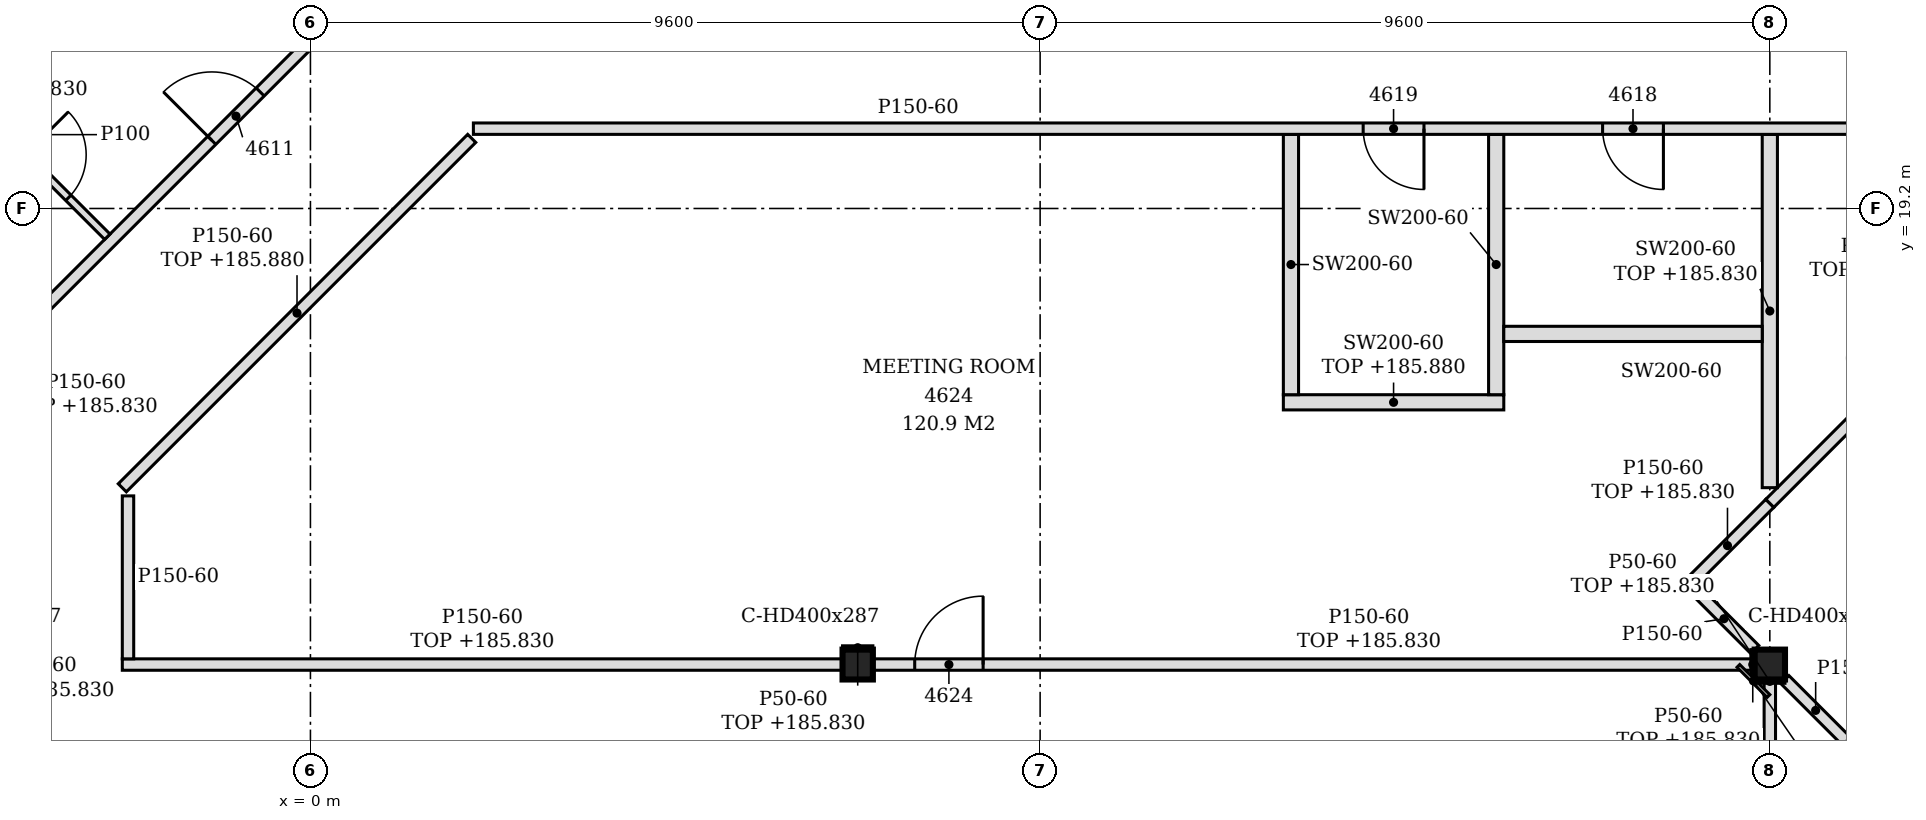
"""IFC4 building model, lengths in metres.
Left out: names, types, materials, properties, quantities, classifications, styles, units other than length and angle.
Written with IfcOpenShell. Run it as: python <this file> out.ifc"""

import sys

from ifc_helpers import new_model, si_unit, direction, frame, frame_2d, origin, origin_2d, place, context, subcontext, project, spatial, polyline, rectangle, i_section, outline, extrude, element, fill, save


model = new_model("IFC4")
c1 = context("Model", 3, precision=1e-05, world=origin(), true_north=direction((0.0, 1.0)))
c2 = subcontext(c1, "Body", "Model", "MODEL_VIEW")
j1 = project(units=[si_unit("LENGTHUNIT", "METRE"), si_unit("PLANEANGLEUNIT", "RADIAN")], contexts=[c1])
p1 = place(None, origin())
s1 = spatial("IfcSite", under=j1, at=p1, CompositionType="ELEMENT")
p2 = place(p1, origin())
s2 = spatial("IfcBuilding", under=s1, at=p2, CompositionType="ELEMENT")
p3 = place(p2, frame((0.0, 0.0, 183.0)))
s3 = spatial("IfcBuildingStorey", under=s2, at=p3, CompositionType="ELEMENT", Elevation=183.0)
for number, where, z_axis, x_axis in (
    (1, (7.2, 13.2, -0.15), (0.0, 0.0, 1.0), (1.0, 0.0, 0.0)),
    (2, (19.2, 13.2, -0.15), (0.0, 0.0, 1.0), (1.0, 0.0, 0.0)),
):
    element("IfcColumn", number, at=place(p3, frame(where, z_axis=z_axis, x_axis=x_axis)), inside=s3, PredefinedType="COLUMN", context=c2, shape_type="SweptSolid", body=[
        extrude(i_section(OverallWidth=0.399, OverallDepth=0.393, WebThickness=0.023, FlangeThickness=0.037, FilletRadius=0.015, at=origin_2d()), origin(), (0.0, 0.0, 1.0), 3.6),
    ])
p4 = place(p3, frame((19.2, 3.675, 0.0), z_axis=(0.0, 0.0, 1.0), x_axis=(0.0, 1.0, 0.0)))
e3 = element("IfcWall", 3, at=p4, inside=s3, PredefinedType="PARTITIONING", context=c2, shape_type="SweptSolid", body=[
    extrude(rectangle(XDim=9.328, YDim=0.15, at=frame_2d((4.664, 0.0))), origin(), (0.0, 0.0, 1.0), 2.83),
])
p5 = place(p3, frame((-14.475, 6.919, 0.0), z_axis=(0.0, 0.0, 1.0), x_axis=(0.707106781187, 0.707106781187, 0.0)))
e4 = element("IfcWall", 4, at=p5, inside=s3, PredefinedType="PARTITIONING", context=c2, shape_type="SweptSolid", body=[
    extrude(rectangle(XDim=22.066, YDim=0.15, at=frame_2d((11.033, 0.0))), origin(), (0.0, 0.0, 1.0), 2.83),
])
p6 = place(p5, frame((18.636, 0.0, 0.0)))
e5 = element("IfcOpeningElement", 5, at=p6, cuts=e4, PredefinedType="OPENING", context=c2, shape_type="SweptSolid", body=[
    extrude(rectangle(XDim=0.9, YDim=2.1, at=frame_2d((0.45, 1.05))), frame((0.0, 0.085, 0.0), z_axis=(0.0, -1.0, 0.0), x_axis=(1.0, 0.0, 0.0)), (0.0, 0.0, 1.0), 0.17),
])
p7 = place(p5, frame((10.648, 0.0, 0.0)))
e6 = element("IfcOpeningElement", 6, at=p7, cuts=e4, PredefinedType="OPENING", context=c2, shape_type="SweptSolid", body=[
    extrude(rectangle(XDim=0.9, YDim=2.1, at=frame_2d((0.45, 1.05))), frame((0.0, 0.085, 0.0), z_axis=(0.0, -1.0, 0.0), x_axis=(1.0, 0.0, 0.0)), (0.0, 0.0, 1.0), 0.17),
])
p8 = place(p5, frame((6.26, 0.0, 0.0)))
e7 = element("IfcOpeningElement", 7, at=p8, cuts=e4, PredefinedType="OPENING", context=c2, shape_type="SweptSolid", body=[
    extrude(rectangle(XDim=0.9, YDim=2.1, at=frame_2d((0.45, 1.05))), frame((0.0, 0.085, 0.0), z_axis=(0.0, -1.0, 0.0), x_axis=(1.0, 0.0, 0.0)), (0.0, 0.0, 1.0), 0.17),
])
p9 = place(p3, frame((20.208, 12.086, 0.0), z_axis=(0.0, 0.0, 1.0), x_axis=(0.706747296365, 0.707466083343, 0.0)))
e8 = element("IfcWall", 8, at=p9, inside=s3, PredefinedType="PARTITIONING", context=c2, shape_type="SweptSolid", body=[
    extrude(rectangle(XDim=1.359, YDim=0.15, at=frame_2d((0.679, 0.0))), origin(), (0.0, 0.0, 1.0), 2.88),
])
p10 = place(p3, frame((20.208, 12.192, 0.0), z_axis=(0.0, 0.0, 1.0), x_axis=(-0.70721334539, 0.707000200921, 0.0)))
e9 = element("IfcWall", 9, at=p10, inside=s3, PredefinedType="PARTITIONING", context=c2, shape_type="SweptSolid", body=[
    extrude(rectangle(XDim=1.146, YDim=0.15, at=frame_2d((0.573, 0.0))), origin(), (0.0, 0.0, 1.0), 3.45),
])
p11 = place(p3, frame((-2.475, 13.2, 0.0), z_axis=(0.0, 0.0, 1.0), x_axis=(1.0, 0.0, 0.0)))
e10 = element("IfcWall", 10, at=p11, inside=s3, PredefinedType="PARTITIONING", context=c2, shape_type="SweptSolid", body=[
    extrude(rectangle(XDim=9.476, YDim=0.15, at=frame_2d((4.738, 0.0))), origin(), (0.0, 0.0, 1.0), 2.83),
])
p12 = place(p3, frame((7.399, 13.2, 0.0), z_axis=(0.0, 0.0, 1.0), x_axis=(1.0, 0.0, 0.0)))
e11 = element("IfcWall", 11, at=p12, inside=s3, PredefinedType="PARTITIONING", context=c2, shape_type="SweptSolid", body=[
    extrude(rectangle(XDim=11.601, YDim=0.15, at=frame_2d((5.801, 0.0))), origin(), (0.0, 0.0, 1.0), 2.83),
])
p13 = place(p12, frame((0.551, 0.0, 0.0)))
e12 = element("IfcOpeningElement", 12, at=p13, cuts=e11, PredefinedType="OPENING", context=c2, shape_type="SweptSolid", body=[
    extrude(rectangle(XDim=0.9, YDim=2.1, at=frame_2d((0.45, 1.05))), frame((0.0, 0.085, 0.0), z_axis=(0.0, -1.0, 0.0), x_axis=(1.0, 0.0, 0.0)), (0.0, 0.0, 1.0), 0.17),
])
p14 = place(p3, frame((-2.4, 13.275, 0.0), z_axis=(0.0, 0.0, 1.0), x_axis=(0.0, 1.0, 0.0)))
e13 = element("IfcWall", 13, at=p14, inside=s3, PredefinedType="PARTITIONING", context=c2, shape_type="SweptSolid", body=[
    extrude(outline(polyline([(0.0, 0.0), (2.144, 0.0), (2.144, 3.45), (0.075, 3.45), (0.073, 2.83), (0.0, 2.83), (0.0, 0.0)])), frame((0.0, 0.075, 0.0), z_axis=(0.0, -1.0, 0.0), x_axis=(1.0, 0.0, 0.0)), (0.0, 0.0, 1.0), 0.15),
])
p15 = place(p3, frame((19.002, 13.398, 0.0), z_axis=(0.0, 0.0, 1.0), x_axis=(-0.707000200921, 0.70721334539, 0.0)))
e14 = element("IfcWall", 14, at=p15, inside=s3, PredefinedType="PARTITIONING", context=c2, shape_type="SweptSolid", body=[
    extrude(rectangle(XDim=1.146, YDim=0.15, at=frame_2d((0.573, 0.0))), origin(), (0.0, 0.0, 1.0), 3.45),
])
p16 = place(p3, frame((18.086, 14.208, 0.0), z_axis=(0.0, 0.0, 1.0), x_axis=(0.707416779731, 0.706796646678, 0.0)))
e15 = element("IfcWall", 15, at=p16, inside=s3, PredefinedType="PARTITIONING", context=c2, shape_type="SweptSolid", body=[
    extrude(rectangle(XDim=1.575, YDim=0.15, at=frame_2d((0.787, 0.0))), origin(), (0.0, 0.0, 1.0), 2.83),
])
p17 = place(p3, frame((19.2, 15.321, 0.0), z_axis=(0.0, 0.0, 1.0), x_axis=(0.707106781187, 0.707106781187, 0.0)))
e16 = element("IfcWall", 16, at=p17, inside=s3, PredefinedType="PARTITIONING", context=c2, shape_type="SweptSolid", body=[
    extrude(rectangle(XDim=4.581, YDim=0.15, at=frame_2d((2.29, 0.0))), origin(), (0.0, 0.0, 1.0), 2.83),
])
p18 = place(p17, frame((1.803, 0.0, 0.0)))
e17 = element("IfcOpeningElement", 17, at=p18, cuts=e16, PredefinedType="OPENING", context=c2, shape_type="SweptSolid", body=[
    extrude(rectangle(XDim=0.9, YDim=2.1, at=frame_2d((0.45, 1.05))), frame((0.0, 0.085, 0.0), z_axis=(0.0, -1.0, 0.0), x_axis=(1.0, 0.0, 0.0)), (0.0, 0.0, 1.0), 0.17),
])
p19 = place(p3, frame((-2.475, 15.525, 0.0), z_axis=(0.0, 0.0, 1.0), x_axis=(0.707106781187, 0.707106781187, 0.0)))
e18 = element("IfcWall", 18, at=p19, inside=s3, PredefinedType="PARTITIONING", context=c2, shape_type="SweptSolid", body=[
    extrude(rectangle(XDim=6.501, YDim=0.15, at=frame_2d((3.251, 0.0))), origin(), (0.0, 0.0, 1.0), 2.88),
])
p20 = place(p3, frame((19.2, 15.527, 0.0), z_axis=(0.0, 0.0, 1.0), x_axis=(0.0, 1.0, 0.0)))
e19 = element("IfcWall", 19, at=p20, inside=s3, PredefinedType="PARTITIONING", context=c2, shape_type="SweptSolid", body=[
    extrude(rectangle(XDim=4.648, YDim=0.2, at=frame_2d((2.324, 0.0))), origin(), (0.0, 0.0, 1.0), 2.83),
])
p21 = place(p3, frame((12.8, 16.65, 0.0), z_axis=(0.0, 0.0, 1.0), x_axis=(1.0, 0.0, 0.0)))
e20 = element("IfcWall", 20, at=p21, inside=s3, PredefinedType="PARTITIONING", context=c2, shape_type="SweptSolid", body=[
    extrude(rectangle(XDim=2.9, YDim=0.2, at=frame_2d((1.45, 0.0))), origin(), (0.0, 0.0, 1.0), 2.88),
])
for number, where, z_axis, x_axis in (
    (21, (12.9, 16.75, 0.0), (0.0, 0.0, 1.0), (0.0, 1.0, 0.0)),
    (22, (15.6, 16.75, 0.0), (0.0, 0.0, 1.0), (0.0, 1.0, 0.0)),
):
    element("IfcWall", number, at=place(p3, frame(where, z_axis=z_axis, x_axis=x_axis)), inside=s3, PredefinedType="PARTITIONING", context=c2, shape_type="SweptSolid", body=[
        extrude(outline(polyline([(0.0, 0.0), (3.425, 0.0), (3.425, 3.45), (0.155, 3.45), (0.153, 2.88), (0.0, 2.88), (0.0, 0.0)])), frame((0.0, 0.1, 0.0), z_axis=(0.0, -1.0, 0.0), x_axis=(1.0, 0.0, 0.0)), (0.0, 0.0, 1.0), 0.2),
    ])
p22 = place(p3, frame((15.7, 17.55, 0.0), z_axis=(0.0, 0.0, 1.0), x_axis=(1.0, 0.0, 0.0)))
e23 = element("IfcWall", 23, at=p22, inside=s3, PredefinedType="PARTITIONING", context=c2, shape_type="SweptSolid", body=[
    extrude(outline(polyline([(0.0, 0.0), (3.4, 0.0), (3.4, 2.83), (3.35, 2.83), (3.348, 3.45), (0.0, 3.45), (0.0, 0.0)])), frame((0.0, 0.1, 0.0), z_axis=(0.0, -1.0, 0.0), x_axis=(1.0, 0.0, 0.0)), (0.0, 0.0, 1.0), 0.2),
])
p23 = place(p3, frame((-2.672, 18.828, 0.0), z_axis=(0.0, 0.0, 1.0), x_axis=(-0.707053116953, 0.707160441348, 0.0)))
e24 = element("IfcWall", 24, at=p23, inside=s3, PredefinedType="PARTITIONING", context=c2, shape_type="SweptSolid", body=[
    extrude(rectangle(XDim=2.275, YDim=0.1, at=frame_2d((1.137, 0.0))), origin(), (0.0, 0.0, 1.0), 3.45),
])
p24 = place(p23, frame((0.725, 0.0, 0.0)))
e25 = element("IfcOpeningElement", 25, at=p24, cuts=e24, PredefinedType="OPENING", context=c2, shape_type="SweptSolid", body=[
    extrude(rectangle(XDim=0.8, YDim=2.1, at=frame_2d((0.4, 1.05))), frame((0.0, 0.06, 0.0), z_axis=(0.0, -1.0, 0.0), x_axis=(1.0, 0.0, 0.0)), (0.0, 0.0, 1.0), 0.12),
])
p25 = place(p3, frame((2.144, 20.25, 0.0), z_axis=(0.0, 0.0, 1.0), x_axis=(1.0, 0.0, 0.0)))
e26 = element("IfcWall", 26, at=p25, inside=s3, PredefinedType="PARTITIONING", context=c2, shape_type="SweptSolid", body=[
    extrude(outline(polyline([(0.0, 0.0), (18.605, 0.0), (18.605, 3.45), (17.206, 3.45), (17.204, 2.83), (16.906, 2.83), (16.904, 3.45), (5.206, 3.45), (5.204, 2.83), (4.906, 2.83), (4.904, 3.45), (0.0, 3.45), (0.0, 0.0)])), frame((0.0, 0.075, 0.0), z_axis=(0.0, -1.0, 0.0), x_axis=(1.0, 0.0, 0.0)), (0.0, 0.0, 1.0), 0.15),
])
p26 = place(p25, frame((14.856, 0.0, 0.0)))
e27 = element("IfcOpeningElement", 27, at=p26, cuts=e26, PredefinedType="OPENING", context=c2, shape_type="SweptSolid", body=[
    extrude(rectangle(XDim=0.8, YDim=2.1, at=frame_2d((0.4, 1.05))), frame((0.0, 0.085, 0.0), z_axis=(0.0, -1.0, 0.0), x_axis=(1.0, 0.0, 0.0)), (0.0, 0.0, 1.0), 0.17),
])
p27 = place(p25, frame((11.706, 0.0, 0.0)))
e28 = element("IfcOpeningElement", 28, at=p27, cuts=e26, PredefinedType="OPENING", context=c2, shape_type="SweptSolid", body=[
    extrude(rectangle(XDim=0.8, YDim=2.1, at=frame_2d((0.4, 1.05))), frame((0.0, 0.085, 0.0), z_axis=(0.0, -1.0, 0.0), x_axis=(1.0, 0.0, 0.0)), (0.0, 0.0, 1.0), 0.17),
])
p28 = place(p3, frame((18.976, 13.003, 0.0), z_axis=(0.0, 0.0, 1.0), x_axis=(0.0, 1.0, 0.0)))
e29 = element("IfcWall", 29, at=p28, inside=s3, PredefinedType="PARTITIONING", context=c2, shape_type="SweptSolid", body=[
    extrude(rectangle(XDim=0.393, YDim=0.05, at=frame_2d((0.197, 0.0))), origin(), (0.0, 0.0, 1.0), 2.83),
])
p29 = place(p3, frame((19.182, 12.786, 0.0), z_axis=(0.0, 0.0, 1.0), x_axis=(-0.707106781187, 0.707106781187, 0.0)))
e30 = element("IfcWall", 30, at=p29, inside=s3, PredefinedType="PARTITIONING", context=c2, shape_type="SweptSolid", body=[
    extrude(rectangle(XDim=0.56, YDim=0.05, at=frame_2d((0.28, 0.0))), origin(), (0.0, 0.0, 1.0), 2.83),
])
for number, where, z_axis, x_axis in (
    (31, (7.0, 13.421, 0.0), (0.0, 0.0, 1.0), (1.0, 0.0, 0.0)),
    (32, (19.0, 12.979, 0.0), (0.0, 0.0, 1.0), (1.0, 0.0, 0.0)),
):
    element("IfcWall", number, at=place(p3, frame(where, z_axis=z_axis, x_axis=x_axis)), inside=s3, PredefinedType="PARTITIONING", context=c2, shape_type="SweptSolid", body=[
        extrude(rectangle(XDim=0.399, YDim=0.05, at=frame_2d((0.199, 0.0))), origin(), (0.0, 0.0, 1.0), 2.83),
    ])
p30 = place(p6, origin())
e33 = element("IfcDoor", 33, at=p30, inside=s3, OperationType="SINGLE_SWING_LEFT", PredefinedType="DOOR", context=c2, shape_type="SweptSolid", body=[
    extrude(rectangle(XDim=0.9, YDim=2.1, at=frame_2d((0.45, 1.05))), frame((0.0, 0.025, 0.0), z_axis=(0.0, -1.0, 0.0), x_axis=(1.0, 0.0, 0.0)), (0.0, 0.0, 1.0), 0.05),
])
fill(e5, e33)
p31 = place(p24, frame((0.8, 0.0, 0.0), z_axis=(0.0, 0.0, 1.0), x_axis=(-1.0, 0.0, 0.0)))
e34 = element("IfcDoor", 34, at=p31, inside=s3, OperationType="SINGLE_SWING_LEFT", PredefinedType="DOOR", context=c2, shape_type="SweptSolid", body=[
    extrude(rectangle(XDim=0.8, YDim=2.1, at=frame_2d((0.4, 1.05))), frame((0.0, 0.025, 0.0), z_axis=(0.0, -1.0, 0.0), x_axis=(1.0, 0.0, 0.0)), (0.0, 0.0, 1.0), 0.05),
])
fill(e25, e34)
p32 = place(p26, frame((0.8, 0.0, 0.0), z_axis=(0.0, 0.0, 1.0), x_axis=(-1.0, 0.0, 0.0)))
e35 = element("IfcDoor", 35, at=p32, inside=s3, OperationType="SINGLE_SWING_LEFT", PredefinedType="DOOR", context=c2, shape_type="SweptSolid", body=[
    extrude(rectangle(XDim=0.8, YDim=2.1, at=frame_2d((0.4, 1.05))), frame((0.0, 0.025, 0.0), z_axis=(0.0, -1.0, 0.0), x_axis=(1.0, 0.0, 0.0)), (0.0, 0.0, 1.0), 0.05),
])
fill(e27, e35)
p33 = place(p27, frame((0.8, 0.0, 0.0), z_axis=(0.0, 0.0, 1.0), x_axis=(-1.0, 0.0, 0.0)))
e36 = element("IfcDoor", 36, at=p33, inside=s3, OperationType="SINGLE_SWING_LEFT", PredefinedType="DOOR", context=c2, shape_type="SweptSolid", body=[
    extrude(rectangle(XDim=0.8, YDim=2.1, at=frame_2d((0.4, 1.05))), frame((0.0, 0.025, 0.0), z_axis=(0.0, -1.0, 0.0), x_axis=(1.0, 0.0, 0.0)), (0.0, 0.0, 1.0), 0.05),
])
fill(e28, e36)
p34 = place(p13, origin())
e37 = element("IfcDoor", 37, at=p34, inside=s3, OperationType="SINGLE_SWING_RIGHT", PredefinedType="DOOR", context=c2, shape_type="SweptSolid", body=[
    extrude(rectangle(XDim=0.9, YDim=2.1, at=frame_2d((0.45, 1.05))), frame((0.0, 0.025, 0.0), z_axis=(0.0, -1.0, 0.0), x_axis=(1.0, 0.0, 0.0)), (0.0, 0.0, 1.0), 0.05),
])
fill(e12, e37)
save(model, sys.argv[1])
